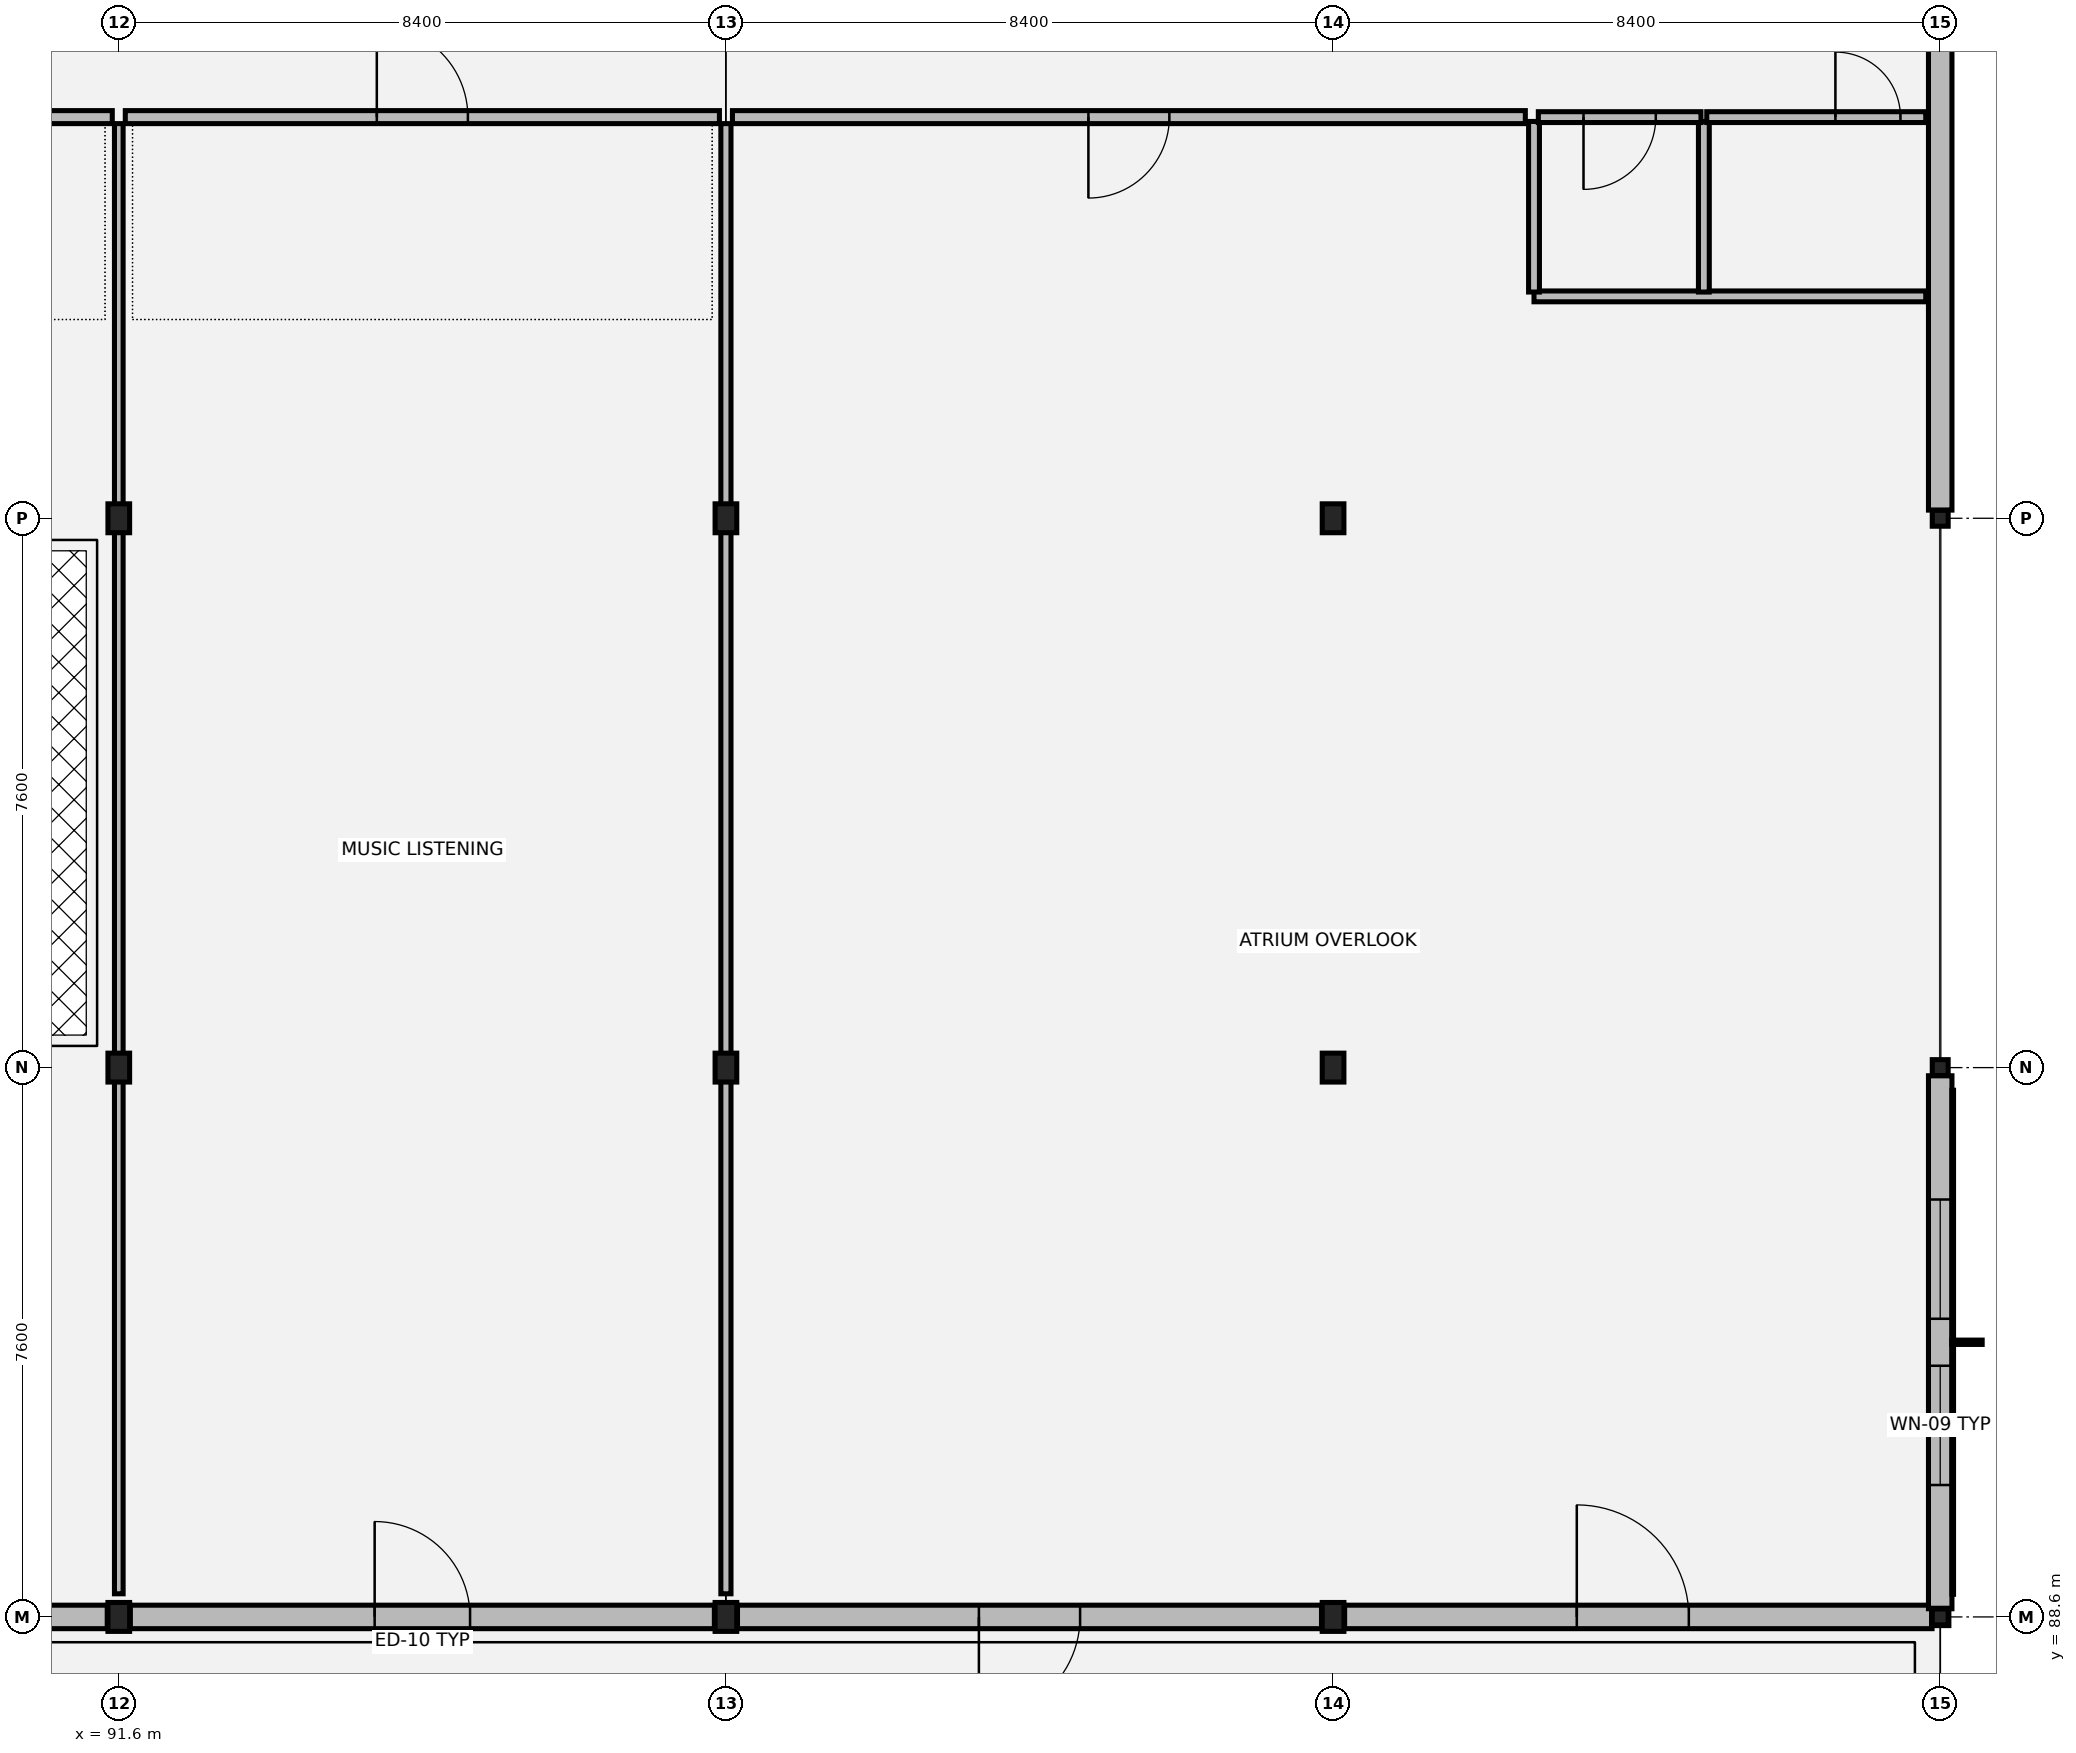
"""IFC4 building model, lengths in metres.
Left out: names, types, materials, properties, quantities, classifications, styles, units other than length and angle.
Written with IfcOpenShell. Run it as: python <this file> out.ifc"""

import sys

from ifc_helpers import new_model, si_unit, direction, frame, frame_2d, origin, origin_2d, place, context, subcontext, project, spatial, rectangle, hollow_rectangle, i_section, extrude, element, fill, save


model = new_model("IFC4")
c1 = context("Model", 3, precision=1e-05, world=origin(), true_north=direction((0.0, 1.0)))
c2 = subcontext(c1, "Body", "Model", "MODEL_VIEW")
j1 = project(units=[si_unit("LENGTHUNIT", "METRE"), si_unit("PLANEANGLEUNIT", "RADIAN")], contexts=[c1])
p1 = place(None, origin())
s1 = spatial("IfcSite", under=j1, at=p1, CompositionType="ELEMENT")
p2 = place(p1, origin())
s2 = spatial("IfcBuilding", under=s1, at=p2, CompositionType="ELEMENT")
p3 = place(p2, frame((0.0, 0.0, 13.26)))
s3 = spatial("IfcBuildingStorey", under=s2, at=p3, CompositionType="ELEMENT", Elevation=13.26)
p4 = place(p3, frame((91.6, 88.6, 0.0), z_axis=(0.0, 0.0, 1.0), x_axis=(1.0, 0.0, 0.0)))
e1 = element("IfcColumn", 1, at=p4, inside=s3, PredefinedType="COLUMN", context=c2, shape_type="SweptSolid", body=[
    extrude(i_section(OverallWidth=0.3, OverallDepth=0.4, WebThickness=0.013, FlangeThickness=0.024, at=origin_2d()), origin(), (0.0, 0.0, 1.0), 3.885),
])
for number, where, z_axis, x_axis in (
    (2, (91.6, 96.2, 0.0), (0.0, 0.0, 1.0), (1.0, 0.0, 0.0)),
    (3, (91.6, 103.8, 0.0), (0.0, 0.0, 1.0), (1.0, 0.0, 0.0)),
):
    element("IfcColumn", number, at=place(p3, frame(where, z_axis=z_axis, x_axis=x_axis)), inside=s3, PredefinedType="COLUMN", context=c2, shape_type="SweptSolid", body=[
        extrude(i_section(OverallWidth=0.3, OverallDepth=0.4, WebThickness=0.013, FlangeThickness=0.024, at=origin_2d()), origin(), (0.0, 0.0, 1.0), 4.055),
    ])
p5 = place(p3, frame((100.0, 88.6, 0.0), z_axis=(0.0, 0.0, 1.0), x_axis=(1.0, 0.0, 0.0)))
e4 = element("IfcColumn", 4, at=p5, inside=s3, PredefinedType="COLUMN", context=c2, shape_type="SweptSolid", body=[
    extrude(i_section(OverallWidth=0.3, OverallDepth=0.4, WebThickness=0.013, FlangeThickness=0.024, at=origin_2d()), origin(), (0.0, 0.0, 1.0), 3.885),
])
for number, where, z_axis, x_axis in (
    (5, (100.0, 96.2, 0.0), (0.0, 0.0, 1.0), (1.0, 0.0, 0.0)),
    (6, (100.0, 103.8, 0.0), (0.0, 0.0, 1.0), (1.0, 0.0, 0.0)),
):
    element("IfcColumn", number, at=place(p3, frame(where, z_axis=z_axis, x_axis=x_axis)), inside=s3, PredefinedType="COLUMN", context=c2, shape_type="SweptSolid", body=[
        extrude(i_section(OverallWidth=0.3, OverallDepth=0.4, WebThickness=0.013, FlangeThickness=0.024, at=origin_2d()), origin(), (0.0, 0.0, 1.0), 4.055),
    ])
p6 = place(p3, frame((108.4, 88.6, 0.0), z_axis=(0.0, 0.0, 1.0), x_axis=(1.0, 0.0, 0.0)))
e7 = element("IfcColumn", 7, at=p6, inside=s3, PredefinedType="COLUMN", context=c2, shape_type="SweptSolid", body=[
    extrude(i_section(OverallWidth=0.3, OverallDepth=0.4, WebThickness=0.013, FlangeThickness=0.024, at=origin_2d()), origin(), (0.0, 0.0, 1.0), 3.885),
])
for number, where, z_axis, x_axis in (
    (8, (108.4, 96.2, 0.0), (0.0, 0.0, 1.0), (1.0, 0.0, 0.0)),
    (9, (108.4, 103.8, 0.0), (0.0, 0.0, 1.0), (1.0, 0.0, 0.0)),
):
    element("IfcColumn", number, at=place(p3, frame(where, z_axis=z_axis, x_axis=x_axis)), inside=s3, PredefinedType="COLUMN", context=c2, shape_type="SweptSolid", body=[
        extrude(i_section(OverallWidth=0.3, OverallDepth=0.4, WebThickness=0.013, FlangeThickness=0.024, at=origin_2d()), origin(), (0.0, 0.0, 1.0), 4.055),
    ])
p7 = place(p3, frame((116.8, 88.6, 0.0), z_axis=(0.0, 0.0, 1.0), x_axis=(1.0, 0.0, 0.0)))
e10 = element("IfcColumn", 10, at=p7, inside=s3, PredefinedType="COLUMN", context=c2, shape_type="SweptSolid", body=[
    extrude(hollow_rectangle(XDim=0.22, YDim=0.22, WallThickness=0.01, at=origin_2d()), origin(), (0.0, 0.0, 1.0), 3.885),
])
for number, where, z_axis, x_axis in (
    (11, (116.8, 96.2, 0.0), (0.0, 0.0, 1.0), (1.0, 0.0, 0.0)),
    (12, (116.8, 103.8, 0.0), (0.0, 0.0, 1.0), (1.0, 0.0, 0.0)),
):
    element("IfcColumn", number, at=place(p3, frame(where, z_axis=z_axis, x_axis=x_axis)), inside=s3, PredefinedType="COLUMN", context=c2, shape_type="SweptSolid", body=[
        extrude(hollow_rectangle(XDim=0.22, YDim=0.22, WallThickness=0.01, at=origin_2d()), origin(), (0.0, 0.0, 1.0), 4.055),
    ])
p8 = place(p3, frame((83.206, 88.6, 0.0), z_axis=(0.0, 0.0, 1.0), x_axis=(1.0, 0.0, 0.0)))
e13 = element("IfcWall", 13, at=p8, inside=s3, PredefinedType="SOLIDWALL", context=c2, shape_type="SweptSolid", body=[
    extrude(rectangle(XDim=8.388, YDim=0.325, at=frame_2d((4.194, 0.0))), origin(), (0.0, 0.0, 1.0), 3.22),
])
p9 = place(p8, frame((3.569, 0.0, 0.0)))
e14 = element("IfcOpeningElement", 14, at=p9, cuts=e13, PredefinedType="OPENING", context=c2, shape_type="SweptSolid", body=[
    extrude(rectangle(XDim=1.25, YDim=2.2, at=frame_2d((0.625, 1.1))), frame((0.0, 0.172, 0.0), z_axis=(0.0, -1.0, 0.0), x_axis=(1.0, 0.0, 0.0)), (0.0, 0.0, 1.0), 0.345),
])
p10 = place(p3, frame((91.606, 88.6, 0.0), z_axis=(0.0, 0.0, 1.0), x_axis=(1.0, 0.0, 0.0)))
e15 = element("IfcWall", 15, at=p10, inside=s3, PredefinedType="SOLIDWALL", context=c2, shape_type="SweptSolid", body=[
    extrude(rectangle(XDim=8.388, YDim=0.325, at=frame_2d((4.194, 0.0))), origin(), (0.0, 0.0, 1.0), 3.22),
])
p11 = place(p10, frame((3.534, 0.0, 0.0)))
e16 = element("IfcOpeningElement", 16, at=p11, cuts=e15, PredefinedType="OPENING", context=c2, shape_type="SweptSolid", body=[
    extrude(rectangle(XDim=1.32, YDim=2.22, at=frame_2d((0.66, 1.11))), frame((0.0, 0.172, 0.0), z_axis=(0.0, -1.0, 0.0), x_axis=(1.0, 0.0, 0.0)), (0.0, 0.0, 1.0), 0.345),
])
p12 = place(p3, frame((100.006, 88.6, 0.0), z_axis=(0.0, 0.0, 1.0), x_axis=(1.0, 0.0, 0.0)))
e17 = element("IfcWall", 17, at=p12, inside=s3, PredefinedType="SOLIDWALL", context=c2, shape_type="SweptSolid", body=[
    extrude(rectangle(XDim=8.388, YDim=0.325, at=frame_2d((4.194, 0.0))), origin(), (0.0, 0.0, 1.0), 3.22),
])
p13 = place(p12, frame((3.494, 0.0, 0.0)))
e18 = element("IfcOpeningElement", 18, at=p13, cuts=e17, PredefinedType="OPENING", context=c2, shape_type="SweptSolid", body=[
    extrude(rectangle(XDim=1.4, YDim=2.25, at=frame_2d((0.7, 1.125))), frame((0.0, 0.172, 0.0), z_axis=(0.0, -1.0, 0.0), x_axis=(1.0, 0.0, 0.0)), (0.0, 0.0, 1.0), 0.345),
])
p14 = place(p3, frame((108.406, 88.6, 0.0), z_axis=(0.0, 0.0, 1.0), x_axis=(1.0, 0.0, 0.0)))
e19 = element("IfcWall", 19, at=p14, inside=s3, PredefinedType="SOLIDWALL", context=c2, shape_type="SweptSolid", body=[
    extrude(rectangle(XDim=8.281, YDim=0.325, at=frame_2d((4.141, 0.0))), origin(), (0.0, 0.0, 1.0), 3.22),
])
p15 = place(p14, frame((3.366, 0.0, 0.0)))
e20 = element("IfcOpeningElement", 20, at=p15, cuts=e19, PredefinedType="OPENING", context=c2, shape_type="SweptSolid", body=[
    extrude(rectangle(XDim=1.55, YDim=2.28, at=frame_2d((0.775, 1.14))), frame((0.0, 0.172, 0.0), z_axis=(0.0, -1.0, 0.0), x_axis=(1.0, 0.0, 0.0)), (0.0, 0.0, 1.0), 0.345),
])
p16 = place(p3, frame((116.8, 88.713, 0.0), z_axis=(0.0, 0.0, 1.0), x_axis=(0.0, 1.0, 0.0)))
e21 = element("IfcWall", 21, at=p16, inside=s3, PredefinedType="SOLIDWALL", context=c2, shape_type="SweptSolid", body=[
    extrude(rectangle(XDim=7.374, YDim=0.325, at=frame_2d((3.687, 0.0))), origin(), (0.0, 0.0, 1.0), 3.48),
])
p17 = place(p16, frame((1.712, 0.0, 0.8)))
e22 = element("IfcOpeningElement", 22, at=p17, cuts=e21, PredefinedType="OPENING", context=c2, shape_type="SweptSolid", body=[
    extrude(rectangle(XDim=1.65, YDim=2.25, at=frame_2d((0.825, 1.125))), frame((0.0, 0.172, 0.0), z_axis=(0.0, -1.0, 0.0), x_axis=(1.0, 0.0, 0.0)), (0.0, 0.0, 1.0), 0.345),
])
p18 = place(p16, frame((4.012, 0.0, 0.8)))
e23 = element("IfcOpeningElement", 23, at=p18, cuts=e21, PredefinedType="OPENING", context=c2, shape_type="SweptSolid", body=[
    extrude(rectangle(XDim=1.65, YDim=2.25, at=frame_2d((0.825, 1.125))), frame((0.0, 0.172, 0.0), z_axis=(0.0, -1.0, 0.0), x_axis=(1.0, 0.0, 0.0)), (0.0, 0.0, 1.0), 0.345),
])
p19 = place(p3, frame((116.8, 103.913, 0.0), z_axis=(0.0, 0.0, 1.0), x_axis=(0.0, 1.0, 0.0)))
e24 = element("IfcWall", 24, at=p19, inside=s3, PredefinedType="SOLIDWALL", context=c2, shape_type="SweptSolid", body=[
    extrude(rectangle(XDim=7.374, YDim=0.325, at=frame_2d((3.687, 0.0))), origin(), (0.0, 0.0, 1.0), 3.48),
])
p20 = place(p3, frame((111.18, 106.87, 0.0), z_axis=(0.0, 0.0, 1.0), x_axis=(1.0, 0.0, 0.0)))
e25 = element("IfcWall", 25, at=p20, inside=s3, PredefinedType="PARTITIONING", context=c2, shape_type="SweptSolid", body=[
    extrude(rectangle(XDim=5.42, YDim=0.15, at=frame_2d((2.71, 0.0))), origin(), (0.0, 0.0, 1.0), 3.18),
])
for number, where, z_axis, x_axis in (
    (26, (111.18, 106.93, 0.0), (0.0, 0.0, 1.0), (0.0, 1.0, 0.0)),
    (27, (113.53, 106.93, 0.0), (0.0, 0.0, 1.0), (0.0, 1.0, 0.0)),
):
    element("IfcWall", number, at=place(p3, frame(where, z_axis=z_axis, x_axis=x_axis)), inside=s3, PredefinedType="PARTITIONING", context=c2, shape_type="SweptSolid", body=[
        extrude(rectangle(XDim=2.36, YDim=0.15, at=frame_2d((1.18, 0.0))), origin(), (0.0, 0.0, 1.0), 3.18),
    ])
p21 = place(p3, frame((111.24, 109.35, 0.0), z_axis=(0.0, 0.0, 1.0), x_axis=(1.0, 0.0, 0.0)))
e28 = element("IfcWall", 28, at=p21, inside=s3, PredefinedType="PARTITIONING", context=c2, shape_type="SweptSolid", body=[
    extrude(rectangle(XDim=2.25, YDim=0.15, at=frame_2d((1.125, 0.0))), origin(), (0.0, 0.0, 1.0), 3.18),
])
p22 = place(p21, frame((0.625, 0.0, 0.0)))
e29 = element("IfcOpeningElement", 29, at=p22, cuts=e28, PredefinedType="OPENING", context=c2, shape_type="SweptSolid", body=[
    extrude(rectangle(XDim=1.0, YDim=2.15, at=frame_2d((0.5, 1.075))), frame((0.0, 0.085, 0.0), z_axis=(0.0, -1.0, 0.0), x_axis=(1.0, 0.0, 0.0)), (0.0, 0.0, 1.0), 0.17),
])
p23 = place(p3, frame((113.57, 109.35, 0.0), z_axis=(0.0, 0.0, 1.0), x_axis=(1.0, 0.0, 0.0)))
e30 = element("IfcWall", 30, at=p23, inside=s3, PredefinedType="PARTITIONING", context=c2, shape_type="SweptSolid", body=[
    extrude(rectangle(XDim=3.03, YDim=0.15, at=frame_2d((1.515, 0.0))), origin(), (0.0, 0.0, 1.0), 3.18),
])
p24 = place(p23, frame((1.78, 0.0, 0.0)))
e31 = element("IfcOpeningElement", 31, at=p24, cuts=e30, PredefinedType="OPENING", context=c2, shape_type="SweptSolid", body=[
    extrude(rectangle(XDim=0.9, YDim=2.15, at=frame_2d((0.45, 1.075))), frame((0.0, 0.085, 0.0), z_axis=(0.0, -1.0, 0.0), x_axis=(1.0, 0.0, 0.0)), (0.0, 0.0, 1.0), 0.17),
])
p25 = place(p3, frame((74.89, 109.35, 0.0), z_axis=(0.0, 0.0, 1.0), x_axis=(1.0, 0.0, 0.0)))
e32 = element("IfcWall", 32, at=p25, inside=s3, PredefinedType="PARTITIONING", context=c2, shape_type="SweptSolid", body=[
    extrude(rectangle(XDim=16.62, YDim=0.18, at=frame_2d((8.31, 0.0))), origin(), (0.0, 0.0, 1.0), 3.18),
])
p26 = place(p25, frame((7.63, 0.0, 0.0)))
e33 = element("IfcOpeningElement", 33, at=p26, cuts=e32, PredefinedType="OPENING", context=c2, shape_type="SweptSolid", body=[
    extrude(rectangle(XDim=1.36, YDim=2.2, at=frame_2d((0.68, 1.1))), frame((0.0, 0.1, 0.0), z_axis=(0.0, -1.0, 0.0), x_axis=(1.0, 0.0, 0.0)), (0.0, 0.0, 1.0), 0.2),
])
p27 = place(p3, frame((91.69, 109.35, 0.0), z_axis=(0.0, 0.0, 1.0), x_axis=(1.0, 0.0, 0.0)))
e34 = element("IfcWall", 34, at=p27, inside=s3, PredefinedType="PARTITIONING", context=c2, shape_type="SweptSolid", body=[
    extrude(rectangle(XDim=8.22, YDim=0.18, at=frame_2d((4.11, 0.0))), origin(), (0.0, 0.0, 1.0), 3.18),
])
p28 = place(p27, frame((3.48, 0.0, 0.0)))
e35 = element("IfcOpeningElement", 35, at=p28, cuts=e34, PredefinedType="OPENING", context=c2, shape_type="SweptSolid", body=[
    extrude(rectangle(XDim=1.26, YDim=2.2, at=frame_2d((0.63, 1.1))), frame((0.0, 0.1, 0.0), z_axis=(0.0, -1.0, 0.0), x_axis=(1.0, 0.0, 0.0)), (0.0, 0.0, 1.0), 0.2),
])
p29 = place(p3, frame((100.09, 109.35, 0.0), z_axis=(0.0, 0.0, 1.0), x_axis=(1.0, 0.0, 0.0)))
e36 = element("IfcWall", 36, at=p29, inside=s3, PredefinedType="PARTITIONING", context=c2, shape_type="SweptSolid", body=[
    extrude(rectangle(XDim=10.97, YDim=0.18, at=frame_2d((5.485, 0.0))), origin(), (0.0, 0.0, 1.0), 3.18),
])
p30 = place(p29, frame((4.925, 0.0, 0.0)))
e37 = element("IfcOpeningElement", 37, at=p30, cuts=e36, PredefinedType="OPENING", context=c2, shape_type="SweptSolid", body=[
    extrude(rectangle(XDim=1.12, YDim=2.15, at=frame_2d((0.56, 1.075))), frame((0.0, 0.1, 0.0), z_axis=(0.0, -1.0, 0.0), x_axis=(1.0, 0.0, 0.0)), (0.0, 0.0, 1.0), 0.2),
])
p31 = place(p3, frame((91.6, 88.92, 0.0), z_axis=(0.0, 0.0, 1.0), x_axis=(0.0, 1.0, 0.0)))
e38 = element("IfcWall", 38, at=p31, inside=s3, PredefinedType="PARTITIONING", context=c2, shape_type="SweptSolid", body=[
    extrude(rectangle(XDim=20.34, YDim=0.12, at=frame_2d((10.17, 0.0))), origin(), (0.0, 0.0, 1.0), 3.18),
])
p32 = place(p3, frame((100.0, 88.92, 0.0), z_axis=(0.0, 0.0, 1.0), x_axis=(0.0, 1.0, 0.0)))
e39 = element("IfcWall", 39, at=p32, inside=s3, PredefinedType="PARTITIONING", context=c2, shape_type="SweptSolid", body=[
    extrude(rectangle(XDim=20.34, YDim=0.14, at=frame_2d((10.17, 0.0))), origin(), (0.0, 0.0, 1.0), 3.18),
])
p33 = place(p11, origin())
e40 = element("IfcDoor", 40, at=p33, inside=s3, OperationType="SINGLE_SWING_LEFT", PredefinedType="DOOR", context=c2, shape_type="SweptSolid", body=[
    extrude(rectangle(XDim=1.32, YDim=2.22, at=frame_2d((0.66, 1.11))), frame((0.0, 0.025, 0.0), z_axis=(0.0, -1.0, 0.0), x_axis=(1.0, 0.0, 0.0)), (0.0, 0.0, 1.0), 0.05),
])
fill(e16, e40)
p34 = place(p13, origin())
e41 = element("IfcDoor", 41, at=p34, inside=s3, OperationType="SINGLE_SWING_RIGHT", PredefinedType="DOOR", context=c2, shape_type="SweptSolid", body=[
    extrude(rectangle(XDim=1.4, YDim=2.25, at=frame_2d((0.7, 1.125))), frame((0.0, 0.025, 0.0), z_axis=(0.0, -1.0, 0.0), x_axis=(1.0, 0.0, 0.0)), (0.0, 0.0, 1.0), 0.05),
])
fill(e18, e41)
p35 = place(p15, origin())
e42 = element("IfcDoor", 42, at=p35, inside=s3, OperationType="SINGLE_SWING_LEFT", PredefinedType="DOOR", context=c2, shape_type="SweptSolid", body=[
    extrude(rectangle(XDim=1.55, YDim=2.28, at=frame_2d((0.775, 1.14))), frame((0.0, 0.025, 0.0), z_axis=(0.0, -1.0, 0.0), x_axis=(1.0, 0.0, 0.0)), (0.0, 0.0, 1.0), 0.05),
])
fill(e20, e42)
p36 = place(p17, origin())
e43 = element("IfcWindow", 43, at=p36, inside=s3, PartitioningType="SINGLE_PANEL", PredefinedType="WINDOW", context=c2, shape_type="SweptSolid", body=[
    extrude(rectangle(XDim=1.65, YDim=2.25, at=frame_2d((0.825, 1.125))), frame((0.0, 0.03, 0.0), z_axis=(0.0, -1.0, 0.0), x_axis=(1.0, 0.0, 0.0)), (0.0, 0.0, 1.0), 0.06),
])
fill(e22, e43)
p37 = place(p18, origin())
e44 = element("IfcWindow", 44, at=p37, inside=s3, PartitioningType="SINGLE_PANEL", PredefinedType="WINDOW", context=c2, shape_type="SweptSolid", body=[
    extrude(rectangle(XDim=1.65, YDim=2.25, at=frame_2d((0.825, 1.125))), frame((0.0, 0.03, 0.0), z_axis=(0.0, -1.0, 0.0), x_axis=(1.0, 0.0, 0.0)), (0.0, 0.0, 1.0), 0.06),
])
fill(e23, e44)
p38 = place(p22, origin())
e45 = element("IfcDoor", 45, at=p38, inside=s3, OperationType="SINGLE_SWING_RIGHT", PredefinedType="DOOR", context=c2, shape_type="SweptSolid", body=[
    extrude(rectangle(XDim=1.0, YDim=2.15, at=frame_2d((0.5, 1.075))), frame((0.0, 0.025, 0.0), z_axis=(0.0, -1.0, 0.0), x_axis=(1.0, 0.0, 0.0)), (0.0, 0.0, 1.0), 0.05),
])
fill(e29, e45)
p39 = place(p24, origin())
e46 = element("IfcDoor", 46, at=p39, inside=s3, OperationType="SINGLE_SWING_LEFT", PredefinedType="DOOR", context=c2, shape_type="SweptSolid", body=[
    extrude(rectangle(XDim=0.9, YDim=2.15, at=frame_2d((0.45, 1.075))), frame((0.0, 0.025, 0.0), z_axis=(0.0, -1.0, 0.0), x_axis=(1.0, 0.0, 0.0)), (0.0, 0.0, 1.0), 0.05),
])
fill(e31, e46)
p40 = place(p28, origin())
e47 = element("IfcDoor", 47, at=p40, inside=s3, OperationType="SINGLE_SWING_LEFT", PredefinedType="DOOR", context=c2, shape_type="SweptSolid", body=[
    extrude(rectangle(XDim=1.26, YDim=2.2, at=frame_2d((0.63, 1.1))), frame((0.0, 0.025, 0.0), z_axis=(0.0, -1.0, 0.0), x_axis=(1.0, 0.0, 0.0)), (0.0, 0.0, 1.0), 0.05),
])
fill(e35, e47)
p41 = place(p30, origin())
e48 = element("IfcDoor", 48, at=p41, inside=s3, OperationType="SINGLE_SWING_RIGHT", PredefinedType="DOOR", context=c2, shape_type="SweptSolid", body=[
    extrude(rectangle(XDim=1.12, YDim=2.15, at=frame_2d((0.56, 1.075))), frame((0.0, 0.025, 0.0), z_axis=(0.0, -1.0, 0.0), x_axis=(1.0, 0.0, 0.0)), (0.0, 0.0, 1.0), 0.05),
])
fill(e37, e48)
save(model, sys.argv[1])
